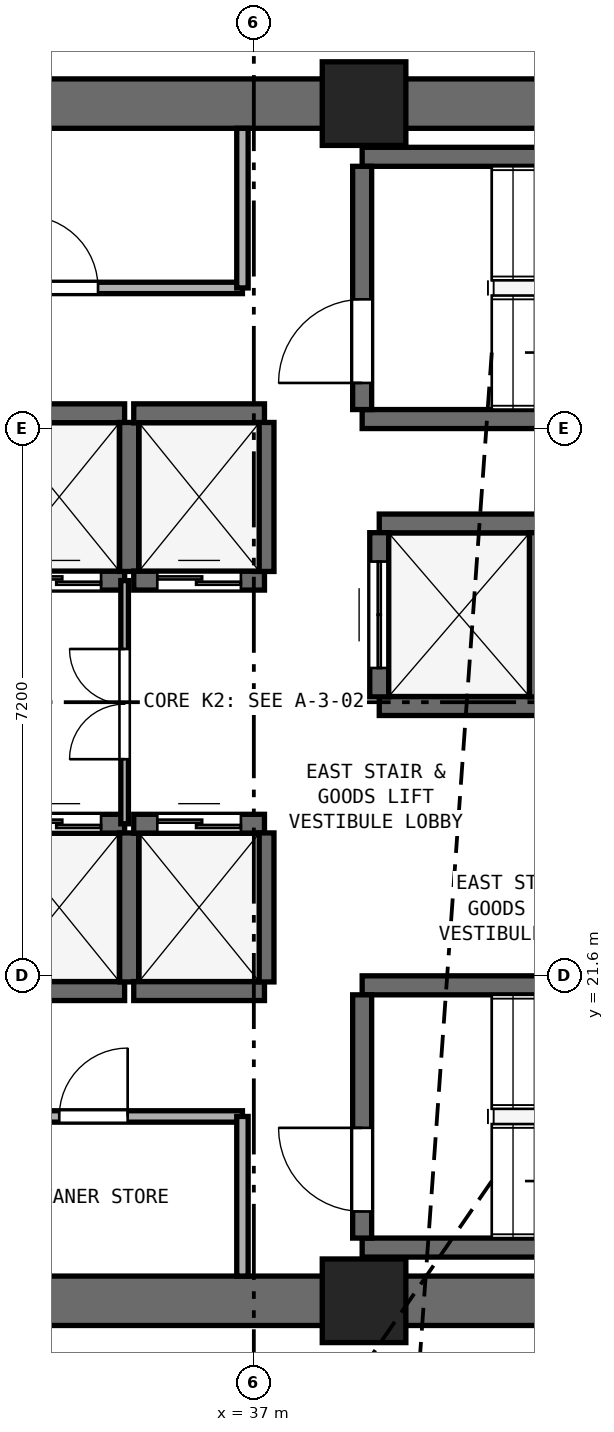
"""IFC4 building model, lengths in metres.
Left out: names, types, materials, properties, quantities, classifications, styles, units other than length and angle.
Written with IfcOpenShell. Run it as: python <this file> out.ifc"""

import sys

from ifc_helpers import new_model, si_unit, direction, frame, frame_2d, origin, origin_2d, place, context, subcontext, project, spatial, rectangle, extrude, element, fill, save


model = new_model("IFC4")
c1 = context("Model", 3, precision=1e-05, world=origin(), true_north=direction((0.0, 1.0)))
c2 = subcontext(c1, "Body", "Model", "MODEL_VIEW")
j1 = project(units=[si_unit("LENGTHUNIT", "METRE"), si_unit("PLANEANGLEUNIT", "RADIAN")], contexts=[c1])
p1 = place(None, origin())
s1 = spatial("IfcSite", under=j1, at=p1, CompositionType="ELEMENT")
p2 = place(p1, origin())
s2 = spatial("IfcBuilding", under=s1, at=p2, CompositionType="ELEMENT")
p3 = place(p2, origin())
s3 = spatial("IfcBuildingStorey", under=s2, at=p3, CompositionType="ELEMENT", Elevation=0.0)
for number, where, z_axis, x_axis in (
    (1, (25.4, 17.325, 0.0), (0.0, 0.0, 1.0), (1.0, 0.0, 0.0)),
    (2, (25.4, 33.075, 0.0), (0.0, 0.0, 1.0), (1.0, 0.0, 0.0)),
):
    element("IfcWall", number, at=place(p3, frame(where, z_axis=z_axis, x_axis=x_axis)), inside=s3, PredefinedType="SHEAR", context=c2, shape_type="SweptSolid", body=[
        extrude(rectangle(XDim=23.2, YDim=0.65, at=frame_2d((11.6, 0.0))), origin(), (0.0, 0.0, 1.0), 4.66),
    ])
for number, where, z_axis, x_axis in (
    (3, (38.45, 17.325, 0.0), (0.0, 0.0, 1.0), (1.0, 0.0, 0.0)),
    (4, (38.45, 33.075, 0.0), (0.0, 0.0, 1.0), (1.0, 0.0, 0.0)),
):
    element("IfcColumn", number, at=place(p3, frame(where, z_axis=z_axis, x_axis=x_axis)), inside=s3, PredefinedType="PILASTER", context=c2, shape_type="SweptSolid", body=[
        extrude(rectangle(XDim=1.1, YDim=1.1, at=origin_2d()), origin(), (0.0, 0.0, 1.0), 5.0),
    ])
for number, where, z_axis, x_axis in (
    (5, (38.425, 28.925, 0.0), (0.0, 0.0, 1.0), (1.0, 0.0, 0.0)),
    (6, (38.425, 32.375, 0.0), (0.0, 0.0, 1.0), (1.0, 0.0, 0.0)),
):
    element("IfcWall", number, at=place(p3, frame(where, z_axis=z_axis, x_axis=x_axis)), inside=s3, PredefinedType="SHEAR", context=c2, shape_type="SweptSolid", body=[
        extrude(rectangle(XDim=7.3, YDim=0.25, at=frame_2d((3.65, 0.0))), origin(), (0.0, 0.0, 1.0), 4.66),
    ])
p4 = place(p3, frame((38.425, 29.05, 0.0), z_axis=(0.0, 0.0, 1.0), x_axis=(0.0, 1.0, 0.0)))
e7 = element("IfcWall", 7, at=p4, inside=s3, PredefinedType="SHEAR", context=c2, shape_type="SweptSolid", body=[
    extrude(rectangle(XDim=3.2, YDim=0.25, at=frame_2d((1.6, 0.0))), origin(), (0.0, 0.0, 1.0), 4.66),
])
p5 = place(p4, frame((0.35, 0.0, 0.0)))
e8 = element("IfcOpeningElement", 8, at=p5, cuts=e7, PredefinedType="OPENING", context=c2, shape_type="SweptSolid", body=[
    extrude(rectangle(XDim=1.1, YDim=2.15, at=frame_2d((0.55, 1.075))), frame((0.0, 0.135, 0.0), z_axis=(0.0, -1.0, 0.0), x_axis=(1.0, 0.0, 0.0)), (0.0, 0.0, 1.0), 0.27),
])
for number, where, z_axis, x_axis in (
    (9, (38.425, 18.025, 0.0), (0.0, 0.0, 1.0), (1.0, 0.0, 0.0)),
    (10, (38.425, 21.475, 0.0), (0.0, 0.0, 1.0), (1.0, 0.0, 0.0)),
):
    element("IfcWall", number, at=place(p3, frame(where, z_axis=z_axis, x_axis=x_axis)), inside=s3, PredefinedType="SHEAR", context=c2, shape_type="SweptSolid", body=[
        extrude(rectangle(XDim=7.3, YDim=0.25, at=frame_2d((3.65, 0.0))), origin(), (0.0, 0.0, 1.0), 4.66),
    ])
p6 = place(p3, frame((38.425, 18.15, 0.0), z_axis=(0.0, 0.0, 1.0), x_axis=(0.0, 1.0, 0.0)))
e11 = element("IfcWall", 11, at=p6, inside=s3, PredefinedType="SHEAR", context=c2, shape_type="SweptSolid", body=[
    extrude(rectangle(XDim=3.2, YDim=0.25, at=frame_2d((1.6, 0.0))), origin(), (0.0, 0.0, 1.0), 4.66),
])
p7 = place(p6, frame((0.35, 0.0, 0.0)))
e12 = element("IfcOpeningElement", 12, at=p7, cuts=e11, PredefinedType="OPENING", context=c2, shape_type="SweptSolid", body=[
    extrude(rectangle(XDim=1.1, YDim=2.15, at=frame_2d((0.55, 1.075))), frame((0.0, 0.135, 0.0), z_axis=(0.0, -1.0, 0.0), x_axis=(1.0, 0.0, 0.0)), (0.0, 0.0, 1.0), 0.27),
])
p8 = place(p3, frame((33.58, 21.4, 0.0), z_axis=(0.0, 0.0, 1.0), x_axis=(1.0, 0.0, 0.0)))
e13 = element("IfcWall", 13, at=p8, inside=s3, PredefinedType="SHEAR", context=c2, shape_type="SweptSolid", body=[
    extrude(rectangle(XDim=1.72, YDim=0.25, at=frame_2d((0.86, 0.0))), origin(), (0.0, 0.0, 1.0), 4.66),
])
p9 = place(p3, frame((33.58, 23.6, 0.0), z_axis=(0.0, 0.0, 1.0), x_axis=(1.0, 0.0, 0.0)))
e14 = element("IfcWall", 14, at=p9, inside=s3, PredefinedType="SHEAR", context=c2, shape_type="SweptSolid", body=[
    extrude(rectangle(XDim=1.72, YDim=0.25, at=frame_2d((0.86, 0.0))), origin(), (0.0, 0.0, 1.0), 4.66),
])
p10 = place(p9, frame((0.31, 0.0, 0.0)))
e15 = element("IfcOpeningElement", 15, at=p10, cuts=e14, PredefinedType="OPENING", context=c2, shape_type="SweptSolid", body=[
    extrude(rectangle(XDim=1.1, YDim=2.15, at=frame_2d((0.55, 1.075))), frame((0.0, 0.135, 0.0), z_axis=(0.0, -1.0, 0.0), x_axis=(1.0, 0.0, 0.0)), (0.0, 0.0, 1.0), 0.27),
])
p11 = place(p3, frame((35.36, 21.52, 0.0), z_axis=(0.0, 0.0, 1.0), x_axis=(0.0, 1.0, 0.0)))
e16 = element("IfcWall", 16, at=p11, inside=s3, PredefinedType="SHEAR", context=c2, shape_type="SweptSolid", body=[
    extrude(rectangle(XDim=1.96, YDim=0.25, at=frame_2d((0.98, 0.0))), origin(), (0.0, 0.0, 1.0), 4.66),
])
p12 = place(p3, frame((35.42, 21.4, 0.0), z_axis=(0.0, 0.0, 1.0), x_axis=(1.0, 0.0, 0.0)))
e17 = element("IfcWall", 17, at=p12, inside=s3, PredefinedType="SHEAR", context=c2, shape_type="SweptSolid", body=[
    extrude(rectangle(XDim=1.72, YDim=0.25, at=frame_2d((0.86, 0.0))), origin(), (0.0, 0.0, 1.0), 4.66),
])
p13 = place(p3, frame((35.42, 23.6, 0.0), z_axis=(0.0, 0.0, 1.0), x_axis=(1.0, 0.0, 0.0)))
e18 = element("IfcWall", 18, at=p13, inside=s3, PredefinedType="SHEAR", context=c2, shape_type="SweptSolid", body=[
    extrude(rectangle(XDim=1.72, YDim=0.25, at=frame_2d((0.86, 0.0))), origin(), (0.0, 0.0, 1.0), 4.66),
])
p14 = place(p13, frame((0.31, 0.0, 0.0)))
e19 = element("IfcOpeningElement", 19, at=p14, cuts=e18, PredefinedType="OPENING", context=c2, shape_type="SweptSolid", body=[
    extrude(rectangle(XDim=1.1, YDim=2.15, at=frame_2d((0.55, 1.075))), frame((0.0, 0.135, 0.0), z_axis=(0.0, -1.0, 0.0), x_axis=(1.0, 0.0, 0.0)), (0.0, 0.0, 1.0), 0.27),
])
p15 = place(p3, frame((37.14, 21.52, 0.0), z_axis=(0.0, 0.0, 1.0), x_axis=(0.0, 1.0, 0.0)))
e20 = element("IfcWall", 20, at=p15, inside=s3, PredefinedType="SHEAR", context=c2, shape_type="SweptSolid", body=[
    extrude(rectangle(XDim=1.96, YDim=0.25, at=frame_2d((0.98, 0.0))), origin(), (0.0, 0.0, 1.0), 4.66),
])
p16 = place(p3, frame((33.58, 26.8, 0.0), z_axis=(0.0, 0.0, 1.0), x_axis=(1.0, 0.0, 0.0)))
e21 = element("IfcWall", 21, at=p16, inside=s3, PredefinedType="SHEAR", context=c2, shape_type="SweptSolid", body=[
    extrude(rectangle(XDim=1.72, YDim=0.25, at=frame_2d((0.86, 0.0))), origin(), (0.0, 0.0, 1.0), 4.66),
])
p17 = place(p16, frame((0.31, 0.0, 0.0)))
e22 = element("IfcOpeningElement", 22, at=p17, cuts=e21, PredefinedType="OPENING", context=c2, shape_type="SweptSolid", body=[
    extrude(rectangle(XDim=1.1, YDim=2.15, at=frame_2d((0.55, 1.075))), frame((0.0, 0.135, 0.0), z_axis=(0.0, -1.0, 0.0), x_axis=(1.0, 0.0, 0.0)), (0.0, 0.0, 1.0), 0.27),
])
p18 = place(p3, frame((33.58, 29.0, 0.0), z_axis=(0.0, 0.0, 1.0), x_axis=(1.0, 0.0, 0.0)))
e23 = element("IfcWall", 23, at=p18, inside=s3, PredefinedType="SHEAR", context=c2, shape_type="SweptSolid", body=[
    extrude(rectangle(XDim=1.72, YDim=0.25, at=frame_2d((0.86, 0.0))), origin(), (0.0, 0.0, 1.0), 4.66),
])
p19 = place(p3, frame((35.36, 26.92, 0.0), z_axis=(0.0, 0.0, 1.0), x_axis=(0.0, 1.0, 0.0)))
e24 = element("IfcWall", 24, at=p19, inside=s3, PredefinedType="SHEAR", context=c2, shape_type="SweptSolid", body=[
    extrude(rectangle(XDim=1.96, YDim=0.25, at=frame_2d((0.98, 0.0))), origin(), (0.0, 0.0, 1.0), 4.66),
])
p20 = place(p3, frame((35.42, 26.8, 0.0), z_axis=(0.0, 0.0, 1.0), x_axis=(1.0, 0.0, 0.0)))
e25 = element("IfcWall", 25, at=p20, inside=s3, PredefinedType="SHEAR", context=c2, shape_type="SweptSolid", body=[
    extrude(rectangle(XDim=1.72, YDim=0.25, at=frame_2d((0.86, 0.0))), origin(), (0.0, 0.0, 1.0), 4.66),
])
p21 = place(p20, frame((0.31, 0.0, 0.0)))
e26 = element("IfcOpeningElement", 26, at=p21, cuts=e25, PredefinedType="OPENING", context=c2, shape_type="SweptSolid", body=[
    extrude(rectangle(XDim=1.1, YDim=2.15, at=frame_2d((0.55, 1.075))), frame((0.0, 0.135, 0.0), z_axis=(0.0, -1.0, 0.0), x_axis=(1.0, 0.0, 0.0)), (0.0, 0.0, 1.0), 0.27),
])
p22 = place(p3, frame((35.42, 29.0, 0.0), z_axis=(0.0, 0.0, 1.0), x_axis=(1.0, 0.0, 0.0)))
e27 = element("IfcWall", 27, at=p22, inside=s3, PredefinedType="SHEAR", context=c2, shape_type="SweptSolid", body=[
    extrude(rectangle(XDim=1.72, YDim=0.25, at=frame_2d((0.86, 0.0))), origin(), (0.0, 0.0, 1.0), 4.66),
])
p23 = place(p3, frame((37.14, 26.92, 0.0), z_axis=(0.0, 0.0, 1.0), x_axis=(0.0, 1.0, 0.0)))
e28 = element("IfcWall", 28, at=p23, inside=s3, PredefinedType="SHEAR", context=c2, shape_type="SweptSolid", body=[
    extrude(rectangle(XDim=1.96, YDim=0.25, at=frame_2d((0.98, 0.0))), origin(), (0.0, 0.0, 1.0), 4.66),
])
for number, where, z_axis, x_axis in (
    (29, (38.65, 25.15, 0.0), (0.0, 0.0, 1.0), (1.0, 0.0, 0.0)),
    (30, (38.65, 27.55, 0.0), (0.0, 0.0, 1.0), (1.0, 0.0, 0.0)),
):
    element("IfcWall", number, at=place(p3, frame(where, z_axis=z_axis, x_axis=x_axis)), inside=s3, PredefinedType="SHEAR", context=c2, shape_type="SweptSolid", body=[
        extrude(rectangle(XDim=2.1, YDim=0.25, at=frame_2d((1.05, 0.0))), origin(), (0.0, 0.0, 1.0), 4.66),
    ])
p24 = place(p3, frame((38.65, 25.27, 0.0), z_axis=(0.0, 0.0, 1.0), x_axis=(0.0, 1.0, 0.0)))
e31 = element("IfcWall", 31, at=p24, inside=s3, PredefinedType="SHEAR", context=c2, shape_type="SweptSolid", body=[
    extrude(rectangle(XDim=2.16, YDim=0.25, at=frame_2d((1.08, 0.0))), origin(), (0.0, 0.0, 1.0), 4.66),
])
p25 = place(p24, frame((0.38, 0.0, 0.0)))
e32 = element("IfcOpeningElement", 32, at=p25, cuts=e31, PredefinedType="OPENING", context=c2, shape_type="SweptSolid", body=[
    extrude(rectangle(XDim=1.4, YDim=2.2, at=frame_2d((0.7, 1.1))), frame((0.0, 0.135, 0.0), z_axis=(0.0, -1.0, 0.0), x_axis=(1.0, 0.0, 0.0)), (0.0, 0.0, 1.0), 0.27),
])
p26 = place(p3, frame((40.75, 25.27, 0.0), z_axis=(0.0, 0.0, 1.0), x_axis=(0.0, 1.0, 0.0)))
e33 = element("IfcWall", 33, at=p26, inside=s3, PredefinedType="SHEAR", context=c2, shape_type="SweptSolid", body=[
    extrude(rectangle(XDim=2.16, YDim=0.25, at=frame_2d((1.08, 0.0))), origin(), (0.0, 0.0, 1.0), 4.66),
])
p27 = place(p3, frame((32.1, 30.65, 0.0), z_axis=(0.0, 0.0, 1.0), x_axis=(1.0, 0.0, 0.0)))
e34 = element("IfcWall", 34, at=p27, inside=s3, PredefinedType="PARTITIONING", context=c2, shape_type="SweptSolid", body=[
    extrude(rectangle(XDim=4.75, YDim=0.15, at=frame_2d((2.375, 0.0))), origin(), (0.0, 0.0, 1.0), 4.66),
])
p28 = place(p27, frame((1.9, 0.0, 0.0)))
e35 = element("IfcOpeningElement", 35, at=p28, cuts=e34, PredefinedType="OPENING", context=c2, shape_type="SweptSolid", body=[
    extrude(rectangle(XDim=0.95, YDim=2.1, at=frame_2d((0.475, 1.05))), frame((0.0, 0.085, 0.0), z_axis=(0.0, -1.0, 0.0), x_axis=(1.0, 0.0, 0.0)), (0.0, 0.0, 1.0), 0.17),
])
p29 = place(p3, frame((36.85, 30.65, 0.0), z_axis=(0.0, 0.0, 1.0), x_axis=(0.0, 1.0, 0.0)))
e36 = element("IfcWall", 36, at=p29, inside=s3, PredefinedType="PARTITIONING", context=c2, shape_type="SweptSolid", body=[
    extrude(rectangle(XDim=2.1, YDim=0.15, at=frame_2d((1.05, 0.0))), origin(), (0.0, 0.0, 1.0), 4.66),
])
p30 = place(p3, frame((32.93, 19.75, 0.0), z_axis=(0.0, 0.0, 1.0), x_axis=(1.0, 0.0, 0.0)))
e37 = element("IfcWall", 37, at=p30, inside=s3, PredefinedType="PARTITIONING", context=c2, shape_type="SweptSolid", body=[
    extrude(rectangle(XDim=3.92, YDim=0.15, at=frame_2d((1.96, 0.0))), origin(), (0.0, 0.0, 1.0), 4.66),
])
p31 = place(p30, frame((1.51, 0.0, 0.0)))
e38 = element("IfcOpeningElement", 38, at=p31, cuts=e37, PredefinedType="OPENING", context=c2, shape_type="SweptSolid", body=[
    extrude(rectangle(XDim=0.9, YDim=2.1, at=frame_2d((0.45, 1.05))), frame((0.0, 0.085, 0.0), z_axis=(0.0, -1.0, 0.0), x_axis=(1.0, 0.0, 0.0)), (0.0, 0.0, 1.0), 0.17),
])
p32 = place(p3, frame((36.85, 17.65, 0.0), z_axis=(0.0, 0.0, 1.0), x_axis=(0.0, 1.0, 0.0)))
e39 = element("IfcWall", 39, at=p32, inside=s3, PredefinedType="PARTITIONING", context=c2, shape_type="SweptSolid", body=[
    extrude(rectangle(XDim=2.1, YDim=0.15, at=frame_2d((1.05, 0.0))), origin(), (0.0, 0.0, 1.0), 4.66),
])
p33 = place(p3, frame((35.3, 23.6, 0.0), z_axis=(0.0, 0.0, 1.0), x_axis=(0.0, 1.0, 0.0)))
e40 = element("IfcWall", 40, at=p33, inside=s3, PredefinedType="PARTITIONING", context=c2, shape_type="SweptSolid", body=[
    extrude(rectangle(XDim=3.2, YDim=0.1, at=frame_2d((1.6, 0.0))), origin(), (0.0, 0.0, 1.0), 4.66),
])
p34 = place(p33, frame((0.85, 0.0, 0.0)))
e41 = element("IfcOpeningElement", 41, at=p34, cuts=e40, PredefinedType="OPENING", context=c2, shape_type="SweptSolid", body=[
    extrude(rectangle(XDim=1.45, YDim=2.12, at=frame_2d((0.725, 1.06))), frame((0.0, 0.06, 0.0), z_axis=(0.0, -1.0, 0.0), x_axis=(1.0, 0.0, 0.0)), (0.0, 0.0, 1.0), 0.12),
])
p35 = place(p5, origin())
e42 = element("IfcDoor", 42, at=p35, inside=s3, OperationType="SINGLE_SWING_LEFT", PredefinedType="DOOR", context=c2, shape_type="SweptSolid", body=[
    extrude(rectangle(XDim=1.1, YDim=2.15, at=frame_2d((0.55, 1.075))), frame((0.0, 0.025, 0.0), z_axis=(0.0, -1.0, 0.0), x_axis=(1.0, 0.0, 0.0)), (0.0, 0.0, 1.0), 0.05),
])
fill(e8, e42)
p36 = place(p7, origin())
e43 = element("IfcDoor", 43, at=p36, inside=s3, OperationType="SINGLE_SWING_RIGHT", PredefinedType="DOOR", context=c2, shape_type="SweptSolid", body=[
    extrude(rectangle(XDim=1.1, YDim=2.15, at=frame_2d((0.55, 1.075))), frame((0.0, 0.025, 0.0), z_axis=(0.0, -1.0, 0.0), x_axis=(1.0, 0.0, 0.0)), (0.0, 0.0, 1.0), 0.05),
])
fill(e12, e43)
p37 = place(p10, origin())
e44 = element("IfcDoor", 44, at=p37, inside=s3, OperationType="DOUBLE_DOOR_SLIDING", PredefinedType="DOOR", context=c2, shape_type="SweptSolid", body=[
    extrude(rectangle(XDim=1.1, YDim=2.15, at=frame_2d((0.55, 1.075))), frame((0.0, 0.025, 0.0), z_axis=(0.0, -1.0, 0.0), x_axis=(1.0, 0.0, 0.0)), (0.0, 0.0, 1.0), 0.05),
])
fill(e15, e44)
p38 = place(p14, origin())
e45 = element("IfcDoor", 45, at=p38, inside=s3, OperationType="DOUBLE_DOOR_SLIDING", PredefinedType="DOOR", context=c2, shape_type="SweptSolid", body=[
    extrude(rectangle(XDim=1.1, YDim=2.15, at=frame_2d((0.55, 1.075))), frame((0.0, 0.025, 0.0), z_axis=(0.0, -1.0, 0.0), x_axis=(1.0, 0.0, 0.0)), (0.0, 0.0, 1.0), 0.05),
])
fill(e19, e45)
p39 = place(p17, origin())
e46 = element("IfcDoor", 46, at=p39, inside=s3, OperationType="DOUBLE_DOOR_SLIDING", PredefinedType="DOOR", context=c2, shape_type="SweptSolid", body=[
    extrude(rectangle(XDim=1.1, YDim=2.15, at=frame_2d((0.55, 1.075))), frame((0.0, 0.025, 0.0), z_axis=(0.0, -1.0, 0.0), x_axis=(1.0, 0.0, 0.0)), (0.0, 0.0, 1.0), 0.05),
])
fill(e22, e46)
p40 = place(p21, origin())
e47 = element("IfcDoor", 47, at=p40, inside=s3, OperationType="DOUBLE_DOOR_SLIDING", PredefinedType="DOOR", context=c2, shape_type="SweptSolid", body=[
    extrude(rectangle(XDim=1.1, YDim=2.15, at=frame_2d((0.55, 1.075))), frame((0.0, 0.025, 0.0), z_axis=(0.0, -1.0, 0.0), x_axis=(1.0, 0.0, 0.0)), (0.0, 0.0, 1.0), 0.05),
])
fill(e26, e47)
p41 = place(p25, origin())
e48 = element("IfcDoor", 48, at=p41, inside=s3, OperationType="DOUBLE_DOOR_SLIDING", PredefinedType="DOOR", context=c2, shape_type="SweptSolid", body=[
    extrude(rectangle(XDim=1.4, YDim=2.2, at=frame_2d((0.7, 1.1))), frame((0.0, 0.025, 0.0), z_axis=(0.0, -1.0, 0.0), x_axis=(1.0, 0.0, 0.0)), (0.0, 0.0, 1.0), 0.05),
])
fill(e32, e48)
p42 = place(p28, origin())
e49 = element("IfcDoor", 49, at=p42, inside=s3, OperationType="SINGLE_SWING_LEFT", PredefinedType="DOOR", context=c2, shape_type="SweptSolid", body=[
    extrude(rectangle(XDim=0.95, YDim=2.1, at=frame_2d((0.475, 1.05))), frame((0.0, 0.025, 0.0), z_axis=(0.0, -1.0, 0.0), x_axis=(1.0, 0.0, 0.0)), (0.0, 0.0, 1.0), 0.05),
])
fill(e35, e49)
p43 = place(p31, origin())
e50 = element("IfcDoor", 50, at=p43, inside=s3, OperationType="SINGLE_SWING_RIGHT", PredefinedType="DOOR", context=c2, shape_type="SweptSolid", body=[
    extrude(rectangle(XDim=0.9, YDim=2.1, at=frame_2d((0.45, 1.05))), frame((0.0, 0.025, 0.0), z_axis=(0.0, -1.0, 0.0), x_axis=(1.0, 0.0, 0.0)), (0.0, 0.0, 1.0), 0.05),
])
fill(e38, e50)
p44 = place(p34, origin())
e51 = element("IfcDoor", 51, at=p44, inside=s3, OperationType="DOUBLE_DOOR_SINGLE_SWING", PredefinedType="DOOR", context=c2, shape_type="SweptSolid", body=[
    extrude(rectangle(XDim=1.45, YDim=2.12, at=frame_2d((0.725, 1.06))), frame((0.0, 0.025, 0.0), z_axis=(0.0, -1.0, 0.0), x_axis=(1.0, 0.0, 0.0)), (0.0, 0.0, 1.0), 0.05),
])
fill(e41, e51)
save(model, sys.argv[1])
